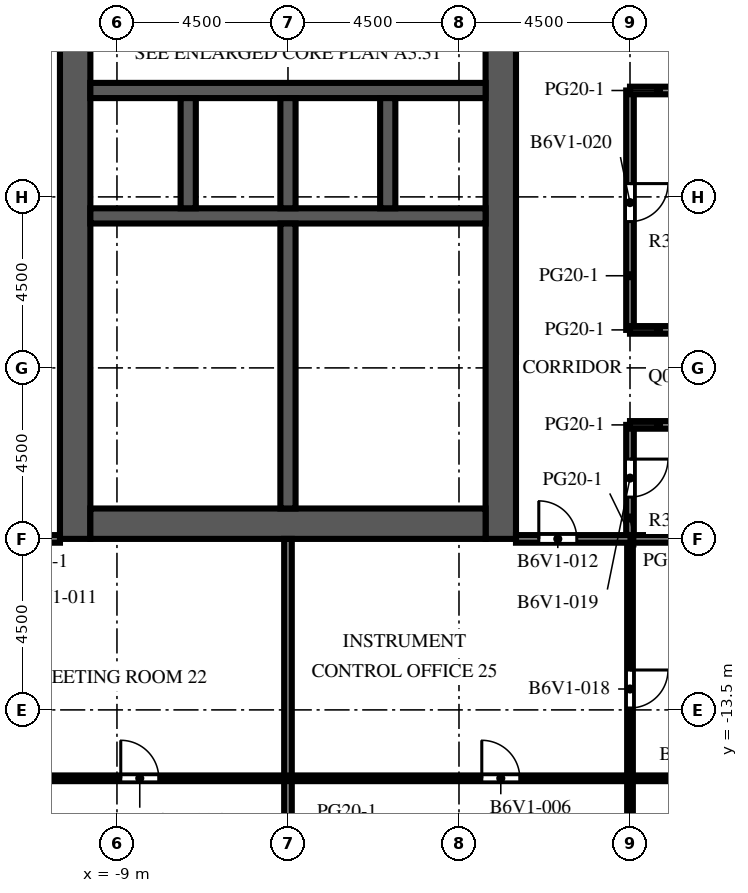
"""IFC4 building model, lengths in metres.
Left out: names, types, materials, properties, quantities, classifications, styles, units other than length and angle.
Written with IfcOpenShell. Run it as: python <this file> out.ifc"""

import sys

from ifc_helpers import new_model, si_unit, direction, frame, frame_2d, origin, place, context, subcontext, project, spatial, rectangle, extrude, element, fill, save


model = new_model("IFC4")
c1 = context("Model", 3, precision=1e-05, world=origin(), true_north=direction((0.0, 1.0)))
c2 = subcontext(c1, "Body", "Model", "MODEL_VIEW")
j1 = project(units=[si_unit("LENGTHUNIT", "METRE"), si_unit("PLANEANGLEUNIT", "RADIAN")], contexts=[c1])
p1 = place(None, origin())
s1 = spatial("IfcSite", under=j1, at=p1, CompositionType="ELEMENT")
p2 = place(p1, origin())
s2 = spatial("IfcBuilding", under=s1, at=p2, CompositionType="ELEMENT")
p3 = place(p2, frame((0.0, 0.0, 203.8)))
s3 = spatial("IfcBuildingStorey", under=s2, at=p3, CompositionType="ELEMENT", Elevation=203.8)
p4 = place(p3, frame((-10.1, -9.0, 0.0), z_axis=(0.0, 0.0, 1.0), x_axis=(0.0, 1.0, 0.0)))
e1 = element("IfcWall", 1, at=p4, inside=s3, PredefinedType="SHEAR", context=c2, shape_type="SweptSolid", body=[
    extrude(rectangle(XDim=27.5, YDim=0.8, at=frame_2d((13.75, 0.0))), origin(), (0.0, 0.0, 1.0), 4.1),
])
p5 = place(p4, frame((12.55, 0.0, 0.0)))
e2 = element("IfcOpeningElement", 2, at=p5, cuts=e1, PredefinedType="OPENING", context=c2, shape_type="SweptSolid", body=[
    extrude(rectangle(XDim=2.4, YDim=2.4, at=frame_2d((1.2, 1.2))), frame((0.0, 0.41, 0.0), z_axis=(0.0, -1.0, 0.0), x_axis=(1.0, 0.0, 0.0)), (0.0, 0.0, 1.0), 0.82),
])
p6 = place(p4, frame((6.825, 0.0, 0.0)))
e3 = element("IfcOpeningElement", 3, at=p6, cuts=e1, PredefinedType="OPENING", context=c2, shape_type="SweptSolid", body=[
    extrude(rectangle(XDim=1.2, YDim=2.1, at=frame_2d((0.6, 1.05))), frame((0.0, 0.41, 0.0), z_axis=(0.0, -1.0, 0.0), x_axis=(1.0, 0.0, 0.0)), (0.0, 0.0, 1.0), 0.82),
])
p7 = place(p4, frame((19.475, 0.0, 0.0)))
e4 = element("IfcOpeningElement", 4, at=p7, cuts=e1, PredefinedType="OPENING", context=c2, shape_type="SweptSolid", body=[
    extrude(rectangle(XDim=1.2, YDim=2.1, at=frame_2d((0.6, 1.05))), frame((0.0, 0.41, 0.0), z_axis=(0.0, -1.0, 0.0), x_axis=(1.0, 0.0, 0.0)), (0.0, 0.0, 1.0), 0.82),
])
p8 = place(p3, frame((1.1, -9.0, 0.0), z_axis=(0.0, 0.0, 1.0), x_axis=(0.0, 1.0, 0.0)))
e5 = element("IfcWall", 5, at=p8, inside=s3, PredefinedType="SHEAR", context=c2, shape_type="SweptSolid", body=[
    extrude(rectangle(XDim=27.5, YDim=0.8, at=frame_2d((13.75, 0.0))), origin(), (0.0, 0.0, 1.0), 4.1),
])
p9 = place(p8, frame((12.55, 0.0, 0.0)))
e6 = element("IfcOpeningElement", 6, at=p9, cuts=e5, PredefinedType="OPENING", context=c2, shape_type="SweptSolid", body=[
    extrude(rectangle(XDim=2.4, YDim=2.4, at=frame_2d((1.2, 1.2))), frame((0.0, 0.41, 0.0), z_axis=(0.0, -1.0, 0.0), x_axis=(1.0, 0.0, 0.0)), (0.0, 0.0, 1.0), 0.82),
])
p10 = place(p8, frame((3.95, 0.0, 0.0)))
e7 = element("IfcOpeningElement", 7, at=p10, cuts=e5, PredefinedType="OPENING", context=c2, shape_type="SweptSolid", body=[
    extrude(rectangle(XDim=1.2, YDim=2.1, at=frame_2d((0.6, 1.05))), frame((0.0, 0.41, 0.0), z_axis=(0.0, -1.0, 0.0), x_axis=(1.0, 0.0, 0.0)), (0.0, 0.0, 1.0), 0.82),
])
p11 = place(p8, frame((22.35, 0.0, 0.0)))
e8 = element("IfcOpeningElement", 8, at=p11, cuts=e5, PredefinedType="OPENING", context=c2, shape_type="SweptSolid", body=[
    extrude(rectangle(XDim=1.2, YDim=2.1, at=frame_2d((0.6, 1.05))), frame((0.0, 0.41, 0.0), z_axis=(0.0, -1.0, 0.0), x_axis=(1.0, 0.0, 0.0)), (0.0, 0.0, 1.0), 0.82),
])
p12 = place(p3, frame((-9.7, -8.6, 0.0), z_axis=(0.0, 0.0, 1.0), x_axis=(1.0, 0.0, 0.0)))
e9 = element("IfcWall", 9, at=p12, inside=s3, PredefinedType="SHEAR", context=c2, shape_type="SweptSolid", body=[
    extrude(rectangle(XDim=10.4, YDim=0.8, at=frame_2d((5.2, 0.0))), origin(), (0.0, 0.0, 1.0), 4.1),
])
p13 = place(p3, frame((-9.7, -0.5, 0.0), z_axis=(0.0, 0.0, 1.0), x_axis=(1.0, 0.0, 0.0)))
e10 = element("IfcWall", 10, at=p13, inside=s3, PredefinedType="SHEAR", context=c2, shape_type="SweptSolid", body=[
    extrude(rectangle(XDim=10.4, YDim=0.4, at=frame_2d((5.2, 0.0))), origin(), (0.0, 0.0, 1.0), 4.1),
])
p14 = place(p3, frame((-9.7, 2.8, 0.0), z_axis=(0.0, 0.0, 1.0), x_axis=(1.0, 0.0, 0.0)))
e11 = element("IfcWall", 11, at=p14, inside=s3, PredefinedType="SHEAR", context=c2, shape_type="SweptSolid", body=[
    extrude(rectangle(XDim=10.4, YDim=0.4, at=frame_2d((5.2, 0.0))), origin(), (0.0, 0.0, 1.0), 4.1),
])
p15 = place(p14, frame((0.738, 0.0, 0.0)))
e12 = element("IfcOpeningElement", 12, at=p15, cuts=e11, PredefinedType="OPENING", context=c2, shape_type="SweptSolid", body=[
    extrude(rectangle(XDim=1.1, YDim=2.1, at=frame_2d((0.55, 1.05))), frame((0.0, 0.21, 0.0), z_axis=(0.0, -1.0, 0.0), x_axis=(1.0, 0.0, 0.0)), (0.0, 0.0, 1.0), 0.42),
])
p16 = place(p14, frame((3.337, 0.0, 0.0)))
e13 = element("IfcOpeningElement", 13, at=p16, cuts=e11, PredefinedType="OPENING", context=c2, shape_type="SweptSolid", body=[
    extrude(rectangle(XDim=1.1, YDim=2.1, at=frame_2d((0.55, 1.05))), frame((0.0, 0.21, 0.0), z_axis=(0.0, -1.0, 0.0), x_axis=(1.0, 0.0, 0.0)), (0.0, 0.0, 1.0), 0.42),
])
p17 = place(p14, frame((6.012, 0.0, 0.0)))
e14 = element("IfcOpeningElement", 14, at=p17, cuts=e11, PredefinedType="OPENING", context=c2, shape_type="SweptSolid", body=[
    extrude(rectangle(XDim=1.0, YDim=2.1, at=frame_2d((0.5, 1.05))), frame((0.0, 0.21, 0.0), z_axis=(0.0, -1.0, 0.0), x_axis=(1.0, 0.0, 0.0)), (0.0, 0.0, 1.0), 0.42),
])
p18 = place(p14, frame((8.613, 0.0, 0.0)))
e15 = element("IfcOpeningElement", 15, at=p18, cuts=e11, PredefinedType="OPENING", context=c2, shape_type="SweptSolid", body=[
    extrude(rectangle(XDim=1.0, YDim=2.1, at=frame_2d((0.5, 1.05))), frame((0.0, 0.21, 0.0), z_axis=(0.0, -1.0, 0.0), x_axis=(1.0, 0.0, 0.0)), (0.0, 0.0, 1.0), 0.42),
])
for number, where, z_axis, x_axis in (
    (16, (-7.125, -0.3, 0.0), (0.0, 0.0, 1.0), (0.0, 1.0, 0.0)),
    (17, (-4.5, -0.3, 0.0), (0.0, 0.0, 1.0), (0.0, 1.0, 0.0)),
    (18, (-1.875, -0.3, 0.0), (0.0, 0.0, 1.0), (0.0, 1.0, 0.0)),
):
    element("IfcWall", number, at=place(p3, frame(where, z_axis=z_axis, x_axis=x_axis)), inside=s3, PredefinedType="SHEAR", context=c2, shape_type="SweptSolid", body=[
        extrude(rectangle(XDim=2.9, YDim=0.4, at=frame_2d((1.45, 0.0))), origin(), (0.0, 0.0, 1.0), 4.1),
    ])
p19 = place(p3, frame((-4.5, -8.2, 0.0), z_axis=(0.0, 0.0, 1.0), x_axis=(0.0, 1.0, 0.0)))
e19 = element("IfcWall", 19, at=p19, inside=s3, PredefinedType="SHEAR", context=c2, shape_type="SweptSolid", body=[
    extrude(rectangle(XDim=7.5, YDim=0.4, at=frame_2d((3.75, 0.0))), origin(), (0.0, 0.0, 1.0), 4.1),
])
p20 = place(p3, frame((-0.8, -8.2, 0.0), z_axis=(0.0, 0.0, 1.0), x_axis=(0.0, 1.0, 0.0)))
e20 = element("IfcWall", 20, at=p20, inside=s3, PredefinedType="PARTITIONING", context=c2, shape_type="SweptSolid", body=[
    extrude(rectangle(XDim=2.25, YDim=0.1, at=frame_2d((1.125, 0.0))), origin(), (0.0, 0.0, 1.0), 3.65),
])
p21 = place(p20, frame((0.625, 0.0, 0.0)))
e21 = element("IfcOpeningElement", 21, at=p21, cuts=e20, PredefinedType="OPENING", context=c2, shape_type="SweptSolid", body=[
    extrude(rectangle(XDim=1.0, YDim=2.1, at=frame_2d((0.5, 1.05))), frame((0.0, 0.06, 0.0), z_axis=(0.0, -1.0, 0.0), x_axis=(1.0, 0.0, 0.0)), (0.0, 0.0, 1.0), 0.12),
])
p22 = place(p3, frame((-0.8, -5.95, 0.0), z_axis=(0.0, 0.0, 1.0), x_axis=(0.0, 1.0, 0.0)))
e22 = element("IfcWall", 22, at=p22, inside=s3, PredefinedType="PARTITIONING", context=c2, shape_type="SweptSolid", body=[
    extrude(rectangle(XDim=2.25, YDim=0.1, at=frame_2d((1.125, 0.0))), origin(), (0.0, 0.0, 1.0), 3.65),
])
p23 = place(p22, frame((0.625, 0.0, 0.0)))
e23 = element("IfcOpeningElement", 23, at=p23, cuts=e22, PredefinedType="OPENING", context=c2, shape_type="SweptSolid", body=[
    extrude(rectangle(XDim=1.0, YDim=2.1, at=frame_2d((0.5, 1.05))), frame((0.0, 0.06, 0.0), z_axis=(0.0, -1.0, 0.0), x_axis=(1.0, 0.0, 0.0)), (0.0, 0.0, 1.0), 0.12),
])
p24 = place(p3, frame((-0.8, -3.7, 0.0), z_axis=(0.0, 0.0, 1.0), x_axis=(0.0, 1.0, 0.0)))
e24 = element("IfcWall", 24, at=p24, inside=s3, PredefinedType="PARTITIONING", context=c2, shape_type="SweptSolid", body=[
    extrude(rectangle(XDim=1.65, YDim=0.1, at=frame_2d((0.825, 0.0))), origin(), (0.0, 0.0, 1.0), 3.65),
])
p25 = place(p24, frame((0.325, 0.0, 0.0)))
e25 = element("IfcOpeningElement", 25, at=p25, cuts=e24, PredefinedType="OPENING", context=c2, shape_type="SweptSolid", body=[
    extrude(rectangle(XDim=1.0, YDim=2.1, at=frame_2d((0.5, 1.05))), frame((0.0, 0.06, 0.0), z_axis=(0.0, -1.0, 0.0), x_axis=(1.0, 0.0, 0.0)), (0.0, 0.0, 1.0), 0.12),
])
p26 = place(p3, frame((-0.8, -2.05, 0.0), z_axis=(0.0, 0.0, 1.0), x_axis=(0.0, 1.0, 0.0)))
e26 = element("IfcWall", 26, at=p26, inside=s3, PredefinedType="PARTITIONING", context=c2, shape_type="SweptSolid", body=[
    extrude(rectangle(XDim=1.35, YDim=0.1, at=frame_2d((0.675, 0.0))), origin(), (0.0, 0.0, 1.0), 3.65),
])
p27 = place(p26, frame((0.2, 0.0, 0.0)))
e27 = element("IfcOpeningElement", 27, at=p27, cuts=e26, PredefinedType="OPENING", context=c2, shape_type="SweptSolid", body=[
    extrude(rectangle(XDim=0.95, YDim=2.1, at=frame_2d((0.475, 1.05))), frame((0.0, 0.06, 0.0), z_axis=(0.0, -1.0, 0.0), x_axis=(1.0, 0.0, 0.0)), (0.0, 0.0, 1.0), 0.12),
])
for number, where, z_axis, x_axis in (
    (28, (-4.3, -5.95, 0.0), (0.0, 0.0, 1.0), (1.0, 0.0, 0.0)),
    (29, (-4.3, -3.7, 0.0), (0.0, 0.0, 1.0), (1.0, 0.0, 0.0)),
    (30, (-4.3, -2.05, 0.0), (0.0, 0.0, 1.0), (1.0, 0.0, 0.0)),
):
    element("IfcWall", number, at=place(p3, frame(where, z_axis=z_axis, x_axis=x_axis)), inside=s3, PredefinedType="PARTITIONING", context=c2, shape_type="SweptSolid", body=[
        extrude(rectangle(XDim=3.5, YDim=0.1, at=frame_2d((1.75, 0.0))), origin(), (0.0, 0.0, 1.0), 3.65),
    ])
p28 = place(p3, frame((-4.5, -26.5, 0.0), z_axis=(0.0, 0.0, 1.0), x_axis=(0.0, 1.0, 0.0)))
e31 = element("IfcWall", 31, at=p28, inside=s3, PredefinedType="PARTITIONING", context=c2, shape_type="SweptSolid", body=[
    extrude(rectangle(XDim=17.5, YDim=0.2, at=frame_2d((8.75, 0.0))), origin(), (0.0, 0.0, 1.0), 3.65),
])
p29 = place(p3, frame((4.5, -9.0, 0.0), z_axis=(0.0, 0.0, 1.0), x_axis=(0.0, -1.0, 0.0)))
e32 = element("IfcWall", 32, at=p29, inside=s3, PredefinedType="PARTITIONING", context=c2, shape_type="SweptSolid", body=[
    extrude(rectangle(XDim=17.5, YDim=0.15, at=frame_2d((8.75, 0.0))), origin(), (0.0, 0.0, 1.0), 3.65),
])
p30 = place(p29, frame((3.45, 0.0, 0.0)))
e33 = element("IfcOpeningElement", 33, at=p30, cuts=e32, PredefinedType="OPENING", context=c2, shape_type="SweptSolid", body=[
    extrude(rectangle(XDim=1.0, YDim=2.1, at=frame_2d((0.5, 1.05))), frame((0.0, 0.085, 0.0), z_axis=(0.0, -1.0, 0.0), x_axis=(1.0, 0.0, 0.0)), (0.0, 0.0, 1.0), 0.17),
])
p31 = place(p3, frame((4.5, -6.0, 0.0), z_axis=(0.0, 0.0, 1.0), x_axis=(0.0, -1.0, 0.0)))
e34 = element("IfcWall", 34, at=p31, inside=s3, PredefinedType="PARTITIONING", context=c2, shape_type="SweptSolid", body=[
    extrude(rectangle(XDim=3.0, YDim=0.2, at=frame_2d((1.5, 0.0))), origin(), (0.0, 0.0, 1.0), 3.65),
])
p32 = place(p31, frame((0.9, 0.0, 0.0)))
e35 = element("IfcOpeningElement", 35, at=p32, cuts=e34, PredefinedType="OPENING", context=c2, shape_type="SweptSolid", body=[
    extrude(rectangle(XDim=1.0, YDim=2.1, at=frame_2d((0.5, 1.05))), frame((0.0, 0.11, 0.0), z_axis=(0.0, -1.0, 0.0), x_axis=(1.0, 0.0, 0.0)), (0.0, 0.0, 1.0), 0.22),
])
p33 = place(p3, frame((4.5, 2.8, 0.0), z_axis=(0.0, 0.0, 1.0), x_axis=(0.0, -1.0, 0.0)))
e36 = element("IfcWall", 36, at=p33, inside=s3, PredefinedType="PARTITIONING", context=c2, shape_type="SweptSolid", body=[
    extrude(rectangle(XDim=6.3, YDim=0.2, at=frame_2d((3.15, 0.0))), origin(), (0.0, 0.0, 1.0), 3.65),
])
p34 = place(p33, frame((2.45, 0.0, 0.0)))
e37 = element("IfcOpeningElement", 37, at=p34, cuts=e36, PredefinedType="OPENING", context=c2, shape_type="SweptSolid", body=[
    extrude(rectangle(XDim=1.0, YDim=2.1, at=frame_2d((0.5, 1.05))), frame((0.0, 0.11, 0.0), z_axis=(0.0, -1.0, 0.0), x_axis=(1.0, 0.0, 0.0)), (0.0, 0.0, 1.0), 0.22),
])
p35 = place(p3, frame((21.0, -15.3, 0.0), z_axis=(0.0, 0.0, 1.0), x_axis=(-1.0, 0.0, 0.0)))
e38 = element("IfcWall", 38, at=p35, inside=s3, PredefinedType="PARTITIONING", context=c2, shape_type="SweptSolid", body=[
    extrude(rectangle(XDim=34.5, YDim=0.15, at=frame_2d((17.25, 0.0))), origin(), (0.0, 0.0, 1.0), 3.65),
])
p36 = place(p35, frame((28.9, 0.0, 0.0)))
e39 = element("IfcOpeningElement", 39, at=p36, cuts=e38, PredefinedType="OPENING", context=c2, shape_type="SweptSolid", body=[
    extrude(rectangle(XDim=1.0, YDim=2.1, at=frame_2d((0.5, 1.05))), frame((0.0, 0.085, 0.0), z_axis=(0.0, -1.0, 0.0), x_axis=(1.0, 0.0, 0.0)), (0.0, 0.0, 1.0), 0.17),
])
p37 = place(p35, frame((19.4, 0.0, 0.0)))
e40 = element("IfcOpeningElement", 40, at=p37, cuts=e38, PredefinedType="OPENING", context=c2, shape_type="SweptSolid", body=[
    extrude(rectangle(XDim=1.0, YDim=2.1, at=frame_2d((0.5, 1.05))), frame((0.0, 0.085, 0.0), z_axis=(0.0, -1.0, 0.0), x_axis=(1.0, 0.0, 0.0)), (0.0, 0.0, 1.0), 0.17),
])
p38 = place(p35, frame((14.15, 0.0, 0.0)))
e41 = element("IfcOpeningElement", 41, at=p38, cuts=e38, PredefinedType="OPENING", context=c2, shape_type="SweptSolid", body=[
    extrude(rectangle(XDim=1.0, YDim=2.1, at=frame_2d((0.5, 1.05))), frame((0.0, 0.085, 0.0), z_axis=(0.0, -1.0, 0.0), x_axis=(1.0, 0.0, 0.0)), (0.0, 0.0, 1.0), 0.17),
])
p39 = place(p35, frame((3.9, 0.0, 0.0)))
e42 = element("IfcOpeningElement", 42, at=p39, cuts=e38, PredefinedType="OPENING", context=c2, shape_type="SweptSolid", body=[
    extrude(rectangle(XDim=1.0, YDim=2.1, at=frame_2d((0.5, 1.05))), frame((0.0, 0.085, 0.0), z_axis=(0.0, -1.0, 0.0), x_axis=(1.0, 0.0, 0.0)), (0.0, 0.0, 1.0), 0.17),
])
p40 = place(p3, frame((-10.5, -9.0, 0.0), z_axis=(0.0, 0.0, 1.0), x_axis=(-1.0, 0.0, 0.0)))
e43 = element("IfcWall", 43, at=p40, inside=s3, PredefinedType="PARTITIONING", context=c2, shape_type="SweptSolid", body=[
    extrude(rectangle(XDim=3.0, YDim=0.2, at=frame_2d((1.5, 0.0))), origin(), (0.0, 0.0, 1.0), 3.65),
])
p41 = place(p40, frame((1.15, 0.0, 0.0)))
e44 = element("IfcOpeningElement", 44, at=p41, cuts=e43, PredefinedType="OPENING", context=c2, shape_type="SweptSolid", body=[
    extrude(rectangle(XDim=1.0, YDim=2.1, at=frame_2d((0.5, 1.05))), frame((0.0, 0.11, 0.0), z_axis=(0.0, -1.0, 0.0), x_axis=(1.0, 0.0, 0.0)), (0.0, 0.0, 1.0), 0.22),
])
p42 = place(p3, frame((6.0, -9.0, 0.0), z_axis=(0.0, 0.0, 1.0), x_axis=(-1.0, 0.0, 0.0)))
e45 = element("IfcWall", 45, at=p42, inside=s3, PredefinedType="PARTITIONING", context=c2, shape_type="SweptSolid", body=[
    extrude(rectangle(XDim=4.5, YDim=0.2, at=frame_2d((2.25, 0.0))), origin(), (0.0, 0.0, 1.0), 3.65),
])
p43 = place(p42, frame((2.9, 0.0, 0.0)))
e46 = element("IfcOpeningElement", 46, at=p43, cuts=e45, PredefinedType="OPENING", context=c2, shape_type="SweptSolid", body=[
    extrude(rectangle(XDim=1.0, YDim=2.1, at=frame_2d((0.5, 1.05))), frame((0.0, 0.11, 0.0), z_axis=(0.0, -1.0, 0.0), x_axis=(1.0, 0.0, 0.0)), (0.0, 0.0, 1.0), 0.22),
])
for number, where, z_axis, x_axis in (
    (47, (4.5, -6.0, 0.0), (0.0, 0.0, 1.0), (1.0, 0.0, 0.0)),
    (48, (4.5, -3.5, 0.0), (0.0, 0.0, 1.0), (1.0, 0.0, 0.0)),
    (49, (4.5, 2.8, 0.0), (0.0, 0.0, 1.0), (1.0, 0.0, 0.0)),
):
    element("IfcWall", number, at=place(p3, frame(where, z_axis=z_axis, x_axis=x_axis)), inside=s3, PredefinedType="PARTITIONING", context=c2, shape_type="SweptSolid", body=[
        extrude(rectangle(XDim=1.5, YDim=0.2, at=frame_2d((0.75, 0.0))), origin(), (0.0, 0.0, 1.0), 3.65),
    ])
p44 = place(p15, origin())
e50 = element("IfcDoor", 50, at=p44, inside=s3, OperationType="DOUBLE_DOOR_SLIDING", PredefinedType="DOOR", context=c2, shape_type="SweptSolid", body=[
    extrude(rectangle(XDim=1.1, YDim=2.1, at=frame_2d((0.55, 1.05))), frame((0.0, 0.025, 0.0), z_axis=(0.0, -1.0, 0.0), x_axis=(1.0, 0.0, 0.0)), (0.0, 0.0, 1.0), 0.05),
])
fill(e12, e50)
p45 = place(p16, origin())
e51 = element("IfcDoor", 51, at=p45, inside=s3, OperationType="DOUBLE_DOOR_SLIDING", PredefinedType="DOOR", context=c2, shape_type="SweptSolid", body=[
    extrude(rectangle(XDim=1.1, YDim=2.1, at=frame_2d((0.55, 1.05))), frame((0.0, 0.025, 0.0), z_axis=(0.0, -1.0, 0.0), x_axis=(1.0, 0.0, 0.0)), (0.0, 0.0, 1.0), 0.05),
])
fill(e13, e51)
p46 = place(p5, origin())
e52 = element("IfcDoor", 52, at=p46, inside=s3, OperationType="DOUBLE_DOOR_DOUBLE_SWING", PredefinedType="DOOR", context=c2, shape_type="SweptSolid", body=[
    extrude(rectangle(XDim=2.4, YDim=2.4, at=frame_2d((1.2, 1.2))), frame((0.0, 0.025, 0.0), z_axis=(0.0, -1.0, 0.0), x_axis=(1.0, 0.0, 0.0)), (0.0, 0.0, 1.0), 0.05),
])
fill(e2, e52)
p47 = place(p9, origin())
e53 = element("IfcDoor", 53, at=p47, inside=s3, OperationType="DOUBLE_DOOR_DOUBLE_SWING", PredefinedType="DOOR", context=c2, shape_type="SweptSolid", body=[
    extrude(rectangle(XDim=2.4, YDim=2.4, at=frame_2d((1.2, 1.2))), frame((0.0, 0.025, 0.0), z_axis=(0.0, -1.0, 0.0), x_axis=(1.0, 0.0, 0.0)), (0.0, 0.0, 1.0), 0.05),
])
fill(e6, e53)
p48 = place(p6, origin())
e54 = element("IfcDoor", 54, at=p48, inside=s3, OperationType="SINGLE_SWING_LEFT", PredefinedType="DOOR", context=c2, shape_type="SweptSolid", body=[
    extrude(rectangle(XDim=1.2, YDim=2.1, at=frame_2d((0.6, 1.05))), frame((0.0, 0.025, 0.0), z_axis=(0.0, -1.0, 0.0), x_axis=(1.0, 0.0, 0.0)), (0.0, 0.0, 1.0), 0.05),
])
fill(e3, e54)
p49 = place(p17, origin())
e55 = element("IfcDoor", 55, at=p49, inside=s3, OperationType="SINGLE_SWING_LEFT", PredefinedType="DOOR", context=c2, shape_type="SweptSolid", body=[
    extrude(rectangle(XDim=1.0, YDim=2.1, at=frame_2d((0.5, 1.05))), frame((0.0, 0.025, 0.0), z_axis=(0.0, -1.0, 0.0), x_axis=(1.0, 0.0, 0.0)), (0.0, 0.0, 1.0), 0.05),
])
fill(e14, e55)
p50 = place(p18, origin())
e56 = element("IfcDoor", 56, at=p50, inside=s3, OperationType="SINGLE_SWING_RIGHT", PredefinedType="DOOR", context=c2, shape_type="SweptSolid", body=[
    extrude(rectangle(XDim=1.0, YDim=2.1, at=frame_2d((0.5, 1.05))), frame((0.0, 0.025, 0.0), z_axis=(0.0, -1.0, 0.0), x_axis=(1.0, 0.0, 0.0)), (0.0, 0.0, 1.0), 0.05),
])
fill(e15, e56)
p51 = place(p10, origin())
e57 = element("IfcDoor", 57, at=p51, inside=s3, OperationType="SINGLE_SWING_LEFT", PredefinedType="DOOR", context=c2, shape_type="SweptSolid", body=[
    extrude(rectangle(XDim=1.2, YDim=2.1, at=frame_2d((0.6, 1.05))), frame((0.0, 0.375, 0.0), z_axis=(0.0, -1.0, 0.0), x_axis=(1.0, 0.0, 0.0)), (0.0, 0.0, 1.0), 0.05),
])
fill(e7, e57)
p52 = place(p21, origin())
e58 = element("IfcDoor", 58, at=p52, inside=s3, OperationType="SINGLE_SWING_RIGHT", PredefinedType="DOOR", context=c2, shape_type="SweptSolid", body=[
    extrude(rectangle(XDim=1.0, YDim=2.1, at=frame_2d((0.5, 1.05))), frame((0.0, 0.025, 0.0), z_axis=(0.0, -1.0, 0.0), x_axis=(1.0, 0.0, 0.0)), (0.0, 0.0, 1.0), 0.05),
])
fill(e21, e58)
p53 = place(p23, origin())
e59 = element("IfcDoor", 59, at=p53, inside=s3, OperationType="SINGLE_SWING_LEFT", PredefinedType="DOOR", context=c2, shape_type="SweptSolid", body=[
    extrude(rectangle(XDim=1.0, YDim=2.1, at=frame_2d((0.5, 1.05))), frame((0.0, 0.025, 0.0), z_axis=(0.0, -1.0, 0.0), x_axis=(1.0, 0.0, 0.0)), (0.0, 0.0, 1.0), 0.05),
])
fill(e23, e59)
p54 = place(p25, origin())
e60 = element("IfcDoor", 60, at=p54, inside=s3, OperationType="SINGLE_SWING_RIGHT", PredefinedType="DOOR", context=c2, shape_type="SweptSolid", body=[
    extrude(rectangle(XDim=1.0, YDim=2.1, at=frame_2d((0.5, 1.05))), frame((0.0, 0.025, 0.0), z_axis=(0.0, -1.0, 0.0), x_axis=(1.0, 0.0, 0.0)), (0.0, 0.0, 1.0), 0.05),
])
fill(e25, e60)
p55 = place(p27, origin())
e61 = element("IfcDoor", 61, at=p55, inside=s3, OperationType="SINGLE_SWING_LEFT", PredefinedType="DOOR", context=c2, shape_type="SweptSolid", body=[
    extrude(rectangle(XDim=0.95, YDim=2.1, at=frame_2d((0.475, 1.05))), frame((0.0, 0.025, 0.0), z_axis=(0.0, -1.0, 0.0), x_axis=(1.0, 0.0, 0.0)), (0.0, 0.0, 1.0), 0.05),
])
fill(e27, e61)
p56 = place(p36, origin())
e62 = element("IfcDoor", 62, at=p56, inside=s3, OperationType="SINGLE_SWING_RIGHT", PredefinedType="DOOR", context=c2, shape_type="SweptSolid", body=[
    extrude(rectangle(XDim=1.0, YDim=2.1, at=frame_2d((0.5, 1.05))), frame((0.0, 0.025, 0.0), z_axis=(0.0, -1.0, 0.0), x_axis=(1.0, 0.0, 0.0)), (0.0, 0.0, 1.0), 0.05),
])
fill(e39, e62)
p57 = place(p37, origin())
e63 = element("IfcDoor", 63, at=p57, inside=s3, OperationType="SINGLE_SWING_RIGHT", PredefinedType="DOOR", context=c2, shape_type="SweptSolid", body=[
    extrude(rectangle(XDim=1.0, YDim=2.1, at=frame_2d((0.5, 1.05))), frame((0.0, 0.025, 0.0), z_axis=(0.0, -1.0, 0.0), x_axis=(1.0, 0.0, 0.0)), (0.0, 0.0, 1.0), 0.05),
])
fill(e40, e63)
p58 = place(p43, origin())
e64 = element("IfcDoor", 64, at=p58, inside=s3, OperationType="SINGLE_SWING_RIGHT", PredefinedType="DOOR", context=c2, shape_type="SweptSolid", body=[
    extrude(rectangle(XDim=1.0, YDim=2.1, at=frame_2d((0.5, 1.05))), frame((0.0, 0.025, 0.0), z_axis=(0.0, -1.0, 0.0), x_axis=(1.0, 0.0, 0.0)), (0.0, 0.0, 1.0), 0.05),
])
fill(e46, e64)
p59 = place(p30, origin())
e65 = element("IfcDoor", 65, at=p59, inside=s3, OperationType="SINGLE_SWING_LEFT", PredefinedType="DOOR", context=c2, shape_type="SweptSolid", body=[
    extrude(rectangle(XDim=1.0, YDim=2.1, at=frame_2d((0.5, 1.05))), frame((0.0, 0.025, 0.0), z_axis=(0.0, -1.0, 0.0), x_axis=(1.0, 0.0, 0.0)), (0.0, 0.0, 1.0), 0.05),
])
fill(e33, e65)
p60 = place(p32, origin())
e66 = element("IfcDoor", 66, at=p60, inside=s3, OperationType="SINGLE_SWING_LEFT", PredefinedType="DOOR", context=c2, shape_type="SweptSolid", body=[
    extrude(rectangle(XDim=1.0, YDim=2.1, at=frame_2d((0.5, 1.05))), frame((0.0, 0.025, 0.0), z_axis=(0.0, -1.0, 0.0), x_axis=(1.0, 0.0, 0.0)), (0.0, 0.0, 1.0), 0.05),
])
fill(e35, e66)
p61 = place(p34, origin())
e67 = element("IfcDoor", 67, at=p61, inside=s3, OperationType="SINGLE_SWING_LEFT", PredefinedType="DOOR", context=c2, shape_type="SweptSolid", body=[
    extrude(rectangle(XDim=1.0, YDim=2.1, at=frame_2d((0.5, 1.05))), frame((0.0, 0.025, 0.0), z_axis=(0.0, -1.0, 0.0), x_axis=(1.0, 0.0, 0.0)), (0.0, 0.0, 1.0), 0.05),
])
fill(e37, e67)
save(model, sys.argv[1])
